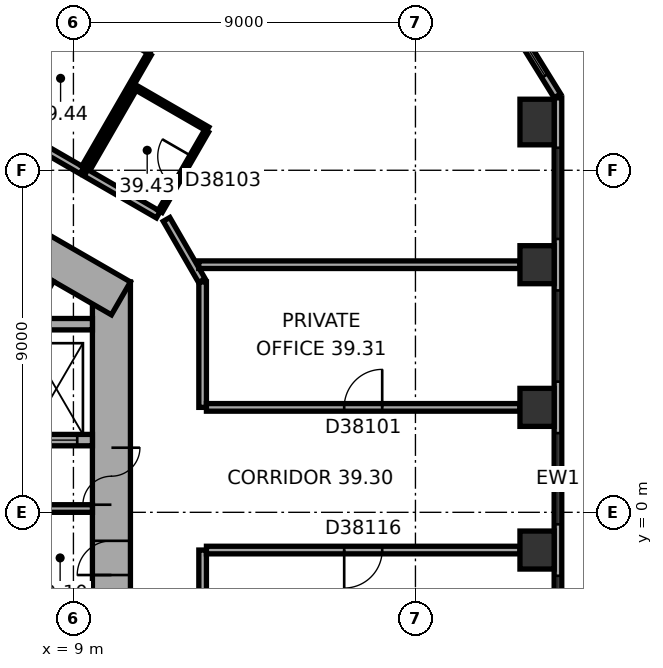
"""IFC4 building model, lengths in metres.
Left out: names, types, materials, properties, quantities, classifications, styles, units other than length and angle.
Written with IfcOpenShell. Run it as: python <this file> out.ifc"""

import sys

from ifc_helpers import new_model, si_unit, direction, frame, frame_2d, origin, origin_2d, place, context, subcontext, project, spatial, rectangle, extrude, element, fill, save


model = new_model("IFC4")
c1 = context("Model", 3, precision=1e-05, world=origin(), true_north=direction((0.0, 1.0)))
c2 = subcontext(c1, "Body", "Model", "MODEL_VIEW")
j1 = project(units=[si_unit("LENGTHUNIT", "METRE"), si_unit("PLANEANGLEUNIT", "RADIAN")], contexts=[c1])
p1 = place(None, origin())
s1 = spatial("IfcSite", under=j1, at=p1, CompositionType="ELEMENT")
p2 = place(p1, origin())
s2 = spatial("IfcBuilding", under=s1, at=p2, CompositionType="ELEMENT")
p3 = place(p2, frame((0.0, 0.0, 161.4)))
s3 = spatial("IfcBuildingStorey", under=s2, at=p3, CompositionType="ELEMENT", Elevation=161.4)
for number, where, z_axis, x_axis in (
    (1, (21.2, -0.993, 0.0), (0.0, 0.0, 1.0), (0.0, 1.0, 0.0)),
    (2, (21.2, 2.761, 0.0), (0.0, 0.0, 1.0), (0.0, 1.0, 0.0)),
    (3, (21.2, 6.515, 0.0), (0.0, 0.0, 1.0), (0.0, 1.0, 0.0)),
):
    element("IfcColumn", number, at=place(p3, frame(where, z_axis=z_axis, x_axis=x_axis)), inside=s3, PredefinedType="COLUMN", context=c2, shape_type="SweptSolid", body=[
        extrude(rectangle(XDim=1.0, YDim=0.9, at=origin_2d()), origin(), (0.0, 0.0, 1.0), 3.7),
    ])
p4 = place(p3, frame((21.2, 10.27, 0.0), z_axis=(0.0, 0.0, 1.0), x_axis=(0.0, 1.0, 0.0)))
e4 = element("IfcColumn", 4, at=p4, inside=s3, PredefinedType="COLUMN", context=c2, shape_type="SweptSolid", body=[
    extrude(rectangle(XDim=1.2, YDim=0.9, at=origin_2d()), origin(), (0.0, 0.0, 1.0), 3.7),
])
p5 = place(p3, frame((10.0, -6.062, 0.0), z_axis=(0.0, 0.0, 1.0), x_axis=(0.0, 1.0, 0.0)))
e5 = element("IfcWall", 5, at=p5, inside=s3, PredefinedType="SHEAR", context=c2, shape_type="SweptSolid", body=[
    extrude(rectangle(XDim=12.125, YDim=1.0, at=frame_2d((6.062, 0.0))), origin(), (0.0, 0.0, 1.0), 3.7),
])
p6 = place(p5, frame((6.262, 0.0, 0.0)))
e6 = element("IfcOpeningElement", 6, at=p6, cuts=e5, PredefinedType="OPENING", context=c2, shape_type="SweptSolid", body=[
    extrude(rectangle(XDim=1.5, YDim=2.1, at=frame_2d((0.75, 1.05))), frame((0.0, 0.51, 0.0), z_axis=(0.0, -1.0, 0.0), x_axis=(1.0, 0.0, 0.0)), (0.0, 0.0, 1.0), 1.02),
])
p7 = place(p5, frame((1.812, 0.0, 0.0)))
e7 = element("IfcOpeningElement", 7, at=p7, cuts=e5, PredefinedType="OPENING", context=c2, shape_type="SweptSolid", body=[
    extrude(rectangle(XDim=0.9, YDim=2.1, at=frame_2d((0.45, 1.05))), frame((0.0, 0.51, 0.0), z_axis=(0.0, -1.0, 0.0), x_axis=(1.0, 0.0, 0.0)), (0.0, 0.0, 1.0), 1.02),
])
p8 = place(p5, frame((4.412, 0.0, 0.0)))
e8 = element("IfcOpeningElement", 8, at=p8, cuts=e5, PredefinedType="OPENING", context=c2, shape_type="SweptSolid", body=[
    extrude(rectangle(XDim=0.9, YDim=2.1, at=frame_2d((0.45, 1.05))), frame((0.0, 0.51, 0.0), z_axis=(0.0, -1.0, 0.0), x_axis=(1.0, 0.0, 0.0)), (0.0, 0.0, 1.0), 1.02),
])
p9 = place(p3, frame((10.25, 5.629, 0.0), z_axis=(0.0, 0.0, 1.0), x_axis=(-0.866022616891, 0.50000482701, 0.0)))
e9 = element("IfcWall", 9, at=p9, inside=s3, PredefinedType="SHEAR", context=c2, shape_type="SweptSolid", body=[
    extrude(rectangle(XDim=12.125, YDim=1.0, at=frame_2d((6.062, 0.0))), origin(), (0.0, 0.0, 1.0), 3.7),
])
p10 = place(p9, frame((2.712, 0.0, 0.0)))
e10 = element("IfcOpeningElement", 10, at=p10, cuts=e9, PredefinedType="OPENING", context=c2, shape_type="SweptSolid", body=[
    extrude(rectangle(XDim=0.9, YDim=2.1, at=frame_2d((0.45, 1.05))), frame((0.0, 0.51, 0.0), z_axis=(0.0, -1.0, 0.0), x_axis=(1.0, 0.0, 0.0)), (0.0, 0.0, 1.0), 1.02),
])
p11 = place(p9, frame((6.612, 0.0, 0.0)))
e11 = element("IfcOpeningElement", 11, at=p11, cuts=e9, PredefinedType="OPENING", context=c2, shape_type="SweptSolid", body=[
    extrude(rectangle(XDim=0.9, YDim=2.1, at=frame_2d((0.45, 1.05))), frame((0.0, 0.51, 0.0), z_axis=(0.0, -1.0, 0.0), x_axis=(1.0, 0.0, 0.0)), (0.0, 0.0, 1.0), 1.02),
])
p12 = place(p3, frame((21.75, -9.138, 0.0), z_axis=(0.0, 0.0, 1.0), x_axis=(0.0, 1.0, 0.0)))
e12 = element("IfcWall", 12, at=p12, inside=s3, PredefinedType="STANDARD", context=c2, shape_type="SweptSolid", body=[
    extrude(rectangle(XDim=20.044, YDim=0.2, at=frame_2d((10.022, 0.0))), origin(), (0.0, 0.0, 1.0), 3.7),
])
p13 = place(p12, frame((1.314, 0.0, 0.9)))
e13 = element("IfcOpeningElement", 13, at=p13, cuts=e12, PredefinedType="OPENING", context=c2, shape_type="SweptSolid", body=[
    extrude(rectangle(XDim=2.4, YDim=2.0, at=frame_2d((1.2, 1.0))), frame((0.0, 0.11, 0.0), z_axis=(0.0, -1.0, 0.0), x_axis=(1.0, 0.0, 0.0)), (0.0, 0.0, 1.0), 0.22),
])
p14 = place(p12, frame((5.069, 0.0, 0.9)))
e14 = element("IfcOpeningElement", 14, at=p14, cuts=e12, PredefinedType="OPENING", context=c2, shape_type="SweptSolid", body=[
    extrude(rectangle(XDim=2.4, YDim=2.0, at=frame_2d((1.2, 1.0))), frame((0.0, 0.11, 0.0), z_axis=(0.0, -1.0, 0.0), x_axis=(1.0, 0.0, 0.0)), (0.0, 0.0, 1.0), 0.22),
])
p15 = place(p12, frame((8.823, 0.0, 0.9)))
e15 = element("IfcOpeningElement", 15, at=p15, cuts=e12, PredefinedType="OPENING", context=c2, shape_type="SweptSolid", body=[
    extrude(rectangle(XDim=2.4, YDim=2.0, at=frame_2d((1.2, 1.0))), frame((0.0, 0.11, 0.0), z_axis=(0.0, -1.0, 0.0), x_axis=(1.0, 0.0, 0.0)), (0.0, 0.0, 1.0), 0.22),
])
p16 = place(p12, frame((12.577, 0.0, 0.9)))
e16 = element("IfcOpeningElement", 16, at=p16, cuts=e12, PredefinedType="OPENING", context=c2, shape_type="SweptSolid", body=[
    extrude(rectangle(XDim=2.4, YDim=2.0, at=frame_2d((1.2, 1.0))), frame((0.0, 0.11, 0.0), z_axis=(0.0, -1.0, 0.0), x_axis=(1.0, 0.0, 0.0)), (0.0, 0.0, 1.0), 0.22),
])
p17 = place(p12, frame((16.331, 0.0, 0.9)))
e17 = element("IfcOpeningElement", 17, at=p17, cuts=e12, PredefinedType="OPENING", context=c2, shape_type="SweptSolid", body=[
    extrude(rectangle(XDim=2.4, YDim=2.0, at=frame_2d((1.2, 1.0))), frame((0.0, 0.11, 0.0), z_axis=(0.0, -1.0, 0.0), x_axis=(1.0, 0.0, 0.0)), (0.0, 0.0, 1.0), 0.22),
])
p18 = place(p3, frame((21.735, 10.958, 0.0), z_axis=(0.0, 0.0, 1.0), x_axis=(-0.526213807775, 0.850352296702, 0.0)))
e18 = element("IfcWall", 18, at=p18, inside=s3, PredefinedType="STANDARD", context=c2, shape_type="SweptSolid", body=[
    extrude(rectangle(XDim=4.238, YDim=0.2, at=frame_2d((2.119, 0.0))), origin(), (0.0, 0.0, 1.0), 3.7),
])
p19 = place(p18, frame((0.619, 0.0, 0.9)))
e19 = element("IfcOpeningElement", 19, at=p19, cuts=e18, PredefinedType="OPENING", context=c2, shape_type="SweptSolid", body=[
    extrude(rectangle(XDim=3.0, YDim=2.0, at=frame_2d((1.5, 1.0))), frame((0.0, 0.11, 0.0), z_axis=(0.0, -1.0, 0.0), x_axis=(1.0, 0.0, 0.0)), (0.0, 0.0, 1.0), 0.22),
])
for number, where, z_axis, x_axis in (
    (20, (7.3, 0.1, 0.0), (0.0, 0.0, 1.0), (1.0, 0.0, 0.0)),
    (21, (7.287, 4.222, 0.0), (0.0, 0.0, 1.0), (0.5, 0.866, 0.0)),
):
    element("IfcWall", number, at=place(p3, frame(where, z_axis=z_axis, x_axis=x_axis)), inside=s3, PredefinedType="PARTITIONING", context=c2, shape_type="SweptSolid", body=[
        extrude(rectangle(XDim=2.2, YDim=0.2, at=frame_2d((1.1, 0.0))), origin(), (0.0, 0.0, 1.0), 3.42),
    ])
p20 = place(p3, frame((7.3, 1.9, 0.0), z_axis=(0.0, 0.0, 1.0), x_axis=(1.0, 0.0, 0.0)))
e22 = element("IfcWall", 22, at=p20, inside=s3, PredefinedType="SHEAR", context=c2, shape_type="SweptSolid", body=[
    extrude(rectangle(XDim=2.2, YDim=0.3, at=frame_2d((1.1, 0.0))), origin(), (0.0, 0.0, 1.0), 3.42),
])
p21 = place(p20, frame((0.7, 0.0, 0.0)))
e23 = element("IfcOpeningElement", 23, at=p21, cuts=e22, PredefinedType="OPENING", context=c2, shape_type="SweptSolid", body=[
    extrude(rectangle(XDim=1.1, YDim=2.1, at=frame_2d((0.55, 1.05))), frame((0.0, 0.16, 0.0), z_axis=(0.0, -1.0, 0.0), x_axis=(1.0, 0.0, 0.0)), (0.0, 0.0, 1.0), 0.32),
])
p22 = place(p3, frame((7.3, 4.95, 0.0), z_axis=(0.0, 0.0, 1.0), x_axis=(1.0, 0.0, 0.0)))
e24 = element("IfcWall", 24, at=p22, inside=s3, PredefinedType="SHEAR", context=c2, shape_type="SweptSolid", body=[
    extrude(rectangle(XDim=2.2, YDim=0.3, at=frame_2d((1.1, 0.0))), origin(), (0.0, 0.0, 1.0), 3.42),
])
p23 = place(p3, frame((8.132, 13.78, 0.0), z_axis=(0.0, 0.0, 1.0), x_axis=(0.866039519639, -0.499975549825, 0.0)))
e25 = element("IfcWall", 25, at=p23, inside=s3, PredefinedType="PARTITIONING", context=c2, shape_type="SweptSolid", body=[
    extrude(rectangle(XDim=3.34, YDim=0.12, at=frame_2d((1.67, 0.0))), origin(), (0.0, 0.0, 1.0), 3.42),
])
p24 = place(p3, frame((8.37, 19.013, 0.0), z_axis=(0.0, 0.0, 1.0), x_axis=(-0.446183598632, -0.894941448538, 0.0)))
e26 = element("IfcWall", 26, at=p24, inside=s3, PredefinedType="PARTITIONING", context=c2, shape_type="SweptSolid", body=[
    extrude(rectangle(XDim=8.156, YDim=0.2, at=frame_2d((4.078, 0.0))), origin(), (0.0, 0.0, 1.0), 3.42),
])
p25 = place(p3, frame((9.224, 8.993, 0.0), z_axis=(0.0, 0.0, 1.0), x_axis=(-0.866031754707, 0.499988999718, 0.0)))
e27 = element("IfcWall", 27, at=p25, inside=s3, PredefinedType="PARTITIONING", context=c2, shape_type="SweptSolid", body=[
    extrude(rectangle(XDim=9.514, YDim=0.2, at=frame_2d((4.757, 0.0))), origin(), (0.0, 0.0, 1.0), 3.42),
])
p26 = place(p25, frame((3.848, 0.0, 0.0)))
e28 = element("IfcOpeningElement", 28, at=p26, cuts=e27, PredefinedType="OPENING", context=c2, shape_type="SweptSolid", body=[
    extrude(rectangle(XDim=1.0, YDim=2.1, at=frame_2d((0.5, 1.05))), frame((0.0, 0.11, 0.0), z_axis=(0.0, -1.0, 0.0), x_axis=(1.0, 0.0, 0.0)), (0.0, 0.0, 1.0), 0.22),
])
p27 = place(p3, frame((9.378, 9.019, 0.0), z_axis=(0.0, 0.0, 1.0), x_axis=(0.500004234368, 0.866022959057, 0.0)))
e29 = element("IfcWall", 29, at=p27, inside=s3, PredefinedType="PARTITIONING", context=c2, shape_type="SweptSolid", body=[
    extrude(rectangle(XDim=2.5, YDim=0.12, at=frame_2d((1.25, 0.0))), origin(), (0.0, 0.0, 1.0), 3.42),
])
p28 = place(p3, frame((10.68, 11.154, 0.0), z_axis=(0.0, 0.0, 1.0), x_axis=(0.86600889856, -0.500028586798, 0.0)))
e30 = element("IfcWall", 30, at=p28, inside=s3, PredefinedType="PARTITIONING", context=c2, shape_type="SweptSolid", body=[
    extrude(rectangle(XDim=2.14, YDim=0.12, at=frame_2d((1.07, 0.0))), origin(), (0.0, 0.0, 1.0), 3.42),
])
p29 = place(p3, frame((10.994, 12.058, 0.0), z_axis=(0.0, 0.0, 1.0), x_axis=(-0.500009156386, -0.866020117278, 0.0)))
e31 = element("IfcWall", 31, at=p29, inside=s3, PredefinedType="PARTITIONING", context=c2, shape_type="SweptSolid", body=[
    extrude(rectangle(XDim=3.44, YDim=0.12, at=frame_2d((1.72, 0.0))), origin(), (0.0, 0.0, 1.0), 3.42),
])
p30 = place(p3, frame((11.233, 7.833, 0.0), z_axis=(0.0, 0.0, 1.0), x_axis=(-0.866008176907, 0.50002983664, 0.0)))
e32 = element("IfcWall", 32, at=p30, inside=s3, PredefinedType="PARTITIONING", context=c2, shape_type="SweptSolid", body=[
    extrude(rectangle(XDim=2.2, YDim=0.2, at=frame_2d((1.1, 0.0))), origin(), (0.0, 0.0, 1.0), 3.42),
])
p31 = place(p3, frame((12.38, 6.097, 0.0), z_axis=(0.0, 0.0, 1.0), x_axis=(-0.499964847546, 0.866045698112, 0.0)))
e33 = element("IfcWall", 33, at=p31, inside=s3, PredefinedType="PARTITIONING", context=c2, shape_type="SweptSolid", body=[
    extrude(rectangle(XDim=1.86, YDim=0.2, at=frame_2d((0.93, 0.0))), origin(), (0.0, 0.0, 1.0), 3.42),
])
p32 = place(p3, frame((12.4, -6.022, 0.0), z_axis=(0.0, 0.0, 1.0), x_axis=(0.0, 1.0, 0.0)))
e34 = element("IfcWall", 34, at=p32, inside=s3, PredefinedType="PARTITIONING", context=c2, shape_type="SweptSolid", body=[
    extrude(rectangle(XDim=5.029, YDim=0.2, at=frame_2d((2.515, 0.0))), origin(), (0.0, 0.0, 1.0), 3.42),
])
p33 = place(p3, frame((12.4, 2.761, 0.0), z_axis=(0.0, 0.0, 1.0), x_axis=(0.0, 1.0, 0.0)))
e35 = element("IfcWall", 35, at=p33, inside=s3, PredefinedType="PARTITIONING", context=c2, shape_type="SweptSolid", body=[
    extrude(rectangle(XDim=3.301, YDim=0.2, at=frame_2d((1.65, 0.0))), origin(), (0.0, 0.0, 1.0), 3.42),
])
p34 = place(p3, frame((12.5, -0.993, 0.0), z_axis=(0.0, 0.0, 1.0), x_axis=(1.0, 0.0, 0.0)))
e36 = element("IfcWall", 36, at=p34, inside=s3, PredefinedType="PARTITIONING", context=c2, shape_type="SweptSolid", body=[
    extrude(rectangle(XDim=8.25, YDim=0.2, at=frame_2d((4.125, 0.0))), origin(), (0.0, 0.0, 1.0), 2.87),
])
p35 = place(p34, frame((3.625, 0.0, 0.0)))
e37 = element("IfcOpeningElement", 37, at=p35, cuts=e36, PredefinedType="OPENING", context=c2, shape_type="SweptSolid", body=[
    extrude(rectangle(XDim=1.0, YDim=2.1, at=frame_2d((0.5, 1.05))), frame((0.0, 0.11, 0.0), z_axis=(0.0, -1.0, 0.0), x_axis=(1.0, 0.0, 0.0)), (0.0, 0.0, 1.0), 0.22),
])
p36 = place(p3, frame((12.503, 10.032, 0.0), z_axis=(0.0, 0.0, 1.0), x_axis=(-0.500002508028, -0.866023955769, 0.0)))
e38 = element("IfcWall", 38, at=p36, inside=s3, PredefinedType="PARTITIONING", context=c2, shape_type="SweptSolid", body=[
    extrude(rectangle(XDim=2.44, YDim=0.12, at=frame_2d((1.22, 0.0))), origin(), (0.0, 0.0, 1.0), 3.42),
])
p37 = place(p36, frame((0.77, 0.0, 0.0)))
e39 = element("IfcOpeningElement", 39, at=p37, cuts=e38, PredefinedType="OPENING", context=c2, shape_type="SweptSolid", body=[
    extrude(rectangle(XDim=0.9, YDim=2.1, at=frame_2d((0.45, 1.05))), frame((0.0, 0.07, 0.0), z_axis=(0.0, -1.0, 0.0), x_axis=(1.0, 0.0, 0.0)), (0.0, 0.0, 1.0), 0.14),
])
p38 = place(p3, frame((20.75, 2.761, 0.0), z_axis=(0.0, 0.0, 1.0), x_axis=(-1.0, 0.0, 0.0)))
e40 = element("IfcWall", 40, at=p38, inside=s3, PredefinedType="PARTITIONING", context=c2, shape_type="SweptSolid", body=[
    extrude(rectangle(XDim=8.25, YDim=0.2, at=frame_2d((4.125, 0.0))), origin(), (0.0, 0.0, 1.0), 3.42),
])
p39 = place(p38, frame((3.625, 0.0, 0.0)))
e41 = element("IfcOpeningElement", 41, at=p39, cuts=e40, PredefinedType="OPENING", context=c2, shape_type="SweptSolid", body=[
    extrude(rectangle(XDim=1.0, YDim=2.1, at=frame_2d((0.5, 1.05))), frame((0.0, 0.11, 0.0), z_axis=(0.0, -1.0, 0.0), x_axis=(1.0, 0.0, 0.0)), (0.0, 0.0, 1.0), 0.22),
])
p40 = place(p3, frame((20.75, 6.515, 0.0), z_axis=(0.0, 0.0, 1.0), x_axis=(-1.0, 0.0, 0.0)))
e42 = element("IfcWall", 42, at=p40, inside=s3, PredefinedType="PARTITIONING", context=c2, shape_type="SweptSolid", body=[
    extrude(rectangle(XDim=8.452, YDim=0.2, at=frame_2d((4.226, 0.0))), origin(), (0.0, 0.0, 1.0), 3.42),
])
p41 = place(p14, origin())
e43 = element("IfcWindow", 43, at=p41, inside=s3, PartitioningType="SINGLE_PANEL", PredefinedType="WINDOW", context=c2, shape_type="SweptSolid", body=[
    extrude(rectangle(XDim=2.4, YDim=2.0, at=frame_2d((1.2, 1.0))), frame((0.0, 0.03, 0.0), z_axis=(0.0, -1.0, 0.0), x_axis=(1.0, 0.0, 0.0)), (0.0, 0.0, 1.0), 0.06),
])
fill(e14, e43)
p42 = place(p15, origin())
e44 = element("IfcWindow", 44, at=p42, inside=s3, PartitioningType="SINGLE_PANEL", PredefinedType="WINDOW", context=c2, shape_type="SweptSolid", body=[
    extrude(rectangle(XDim=2.4, YDim=2.0, at=frame_2d((1.2, 1.0))), frame((0.0, 0.03, 0.0), z_axis=(0.0, -1.0, 0.0), x_axis=(1.0, 0.0, 0.0)), (0.0, 0.0, 1.0), 0.06),
])
fill(e15, e44)
p43 = place(p16, origin())
e45 = element("IfcWindow", 45, at=p43, inside=s3, PartitioningType="SINGLE_PANEL", PredefinedType="WINDOW", context=c2, shape_type="SweptSolid", body=[
    extrude(rectangle(XDim=2.4, YDim=2.0, at=frame_2d((1.2, 1.0))), frame((0.0, 0.03, 0.0), z_axis=(0.0, -1.0, 0.0), x_axis=(1.0, 0.0, 0.0)), (0.0, 0.0, 1.0), 0.06),
])
fill(e16, e45)
p44 = place(p17, origin())
e46 = element("IfcWindow", 46, at=p44, inside=s3, PartitioningType="SINGLE_PANEL", PredefinedType="WINDOW", context=c2, shape_type="SweptSolid", body=[
    extrude(rectangle(XDim=2.4, YDim=2.0, at=frame_2d((1.2, 1.0))), frame((0.0, 0.03, 0.0), z_axis=(0.0, -1.0, 0.0), x_axis=(1.0, 0.0, 0.0)), (0.0, 0.0, 1.0), 0.06),
])
fill(e17, e46)
p45 = place(p19, origin())
e47 = element("IfcWindow", 47, at=p45, inside=s3, PartitioningType="SINGLE_PANEL", PredefinedType="WINDOW", context=c2, shape_type="SweptSolid", body=[
    extrude(rectangle(XDim=3.0, YDim=2.0, at=frame_2d((1.5, 1.0))), frame((0.0, 0.03, 0.0), z_axis=(0.0, -1.0, 0.0), x_axis=(1.0, 0.0, 0.0)), (0.0, 0.0, 1.0), 0.06),
])
fill(e19, e47)
p46 = place(p6, origin())
e48 = element("IfcDoor", 48, at=p46, inside=s3, OperationType="DOUBLE_DOOR_SINGLE_SWING", PredefinedType="DOOR", context=c2, shape_type="SweptSolid", body=[
    extrude(rectangle(XDim=1.5, YDim=2.1, at=frame_2d((0.75, 1.05))), frame((0.0, 0.025, 0.0), z_axis=(0.0, -1.0, 0.0), x_axis=(1.0, 0.0, 0.0)), (0.0, 0.0, 1.0), 0.05),
])
fill(e6, e48)
p47 = place(p8, origin())
e49 = element("IfcDoor", 49, at=p47, inside=s3, OperationType="SINGLE_SWING_LEFT", PredefinedType="DOOR", context=c2, shape_type="SweptSolid", body=[
    extrude(rectangle(XDim=0.9, YDim=2.1, at=frame_2d((0.45, 1.05))), frame((0.0, 0.025, 0.0), z_axis=(0.0, -1.0, 0.0), x_axis=(1.0, 0.0, 0.0)), (0.0, 0.0, 1.0), 0.05),
])
fill(e8, e49)
p48 = place(p21, origin())
e50 = element("IfcDoor", 50, at=p48, inside=s3, OperationType="DOUBLE_DOOR_SLIDING", PredefinedType="DOOR", context=c2, shape_type="SweptSolid", body=[
    extrude(rectangle(XDim=1.1, YDim=2.1, at=frame_2d((0.55, 1.05))), frame((0.0, 0.025, 0.0), z_axis=(0.0, -1.0, 0.0), x_axis=(1.0, 0.0, 0.0)), (0.0, 0.0, 1.0), 0.05),
])
fill(e23, e50)
p49 = place(p39, origin())
e51 = element("IfcDoor", 51, at=p49, inside=s3, OperationType="SINGLE_SWING_LEFT", PredefinedType="DOOR", context=c2, shape_type="SweptSolid", body=[
    extrude(rectangle(XDim=1.0, YDim=2.1, at=frame_2d((0.5, 1.05))), frame((0.0, 0.025, 0.0), z_axis=(0.0, -1.0, 0.0), x_axis=(1.0, 0.0, 0.0)), (0.0, 0.0, 1.0), 0.05),
])
fill(e41, e51)
p50 = place(p37, origin())
e52 = element("IfcDoor", 52, at=p50, inside=s3, OperationType="SINGLE_SWING_LEFT", PredefinedType="DOOR", context=c2, shape_type="SweptSolid", body=[
    extrude(rectangle(XDim=0.9, YDim=2.1, at=frame_2d((0.45, 1.05))), frame((0.0, 0.025, 0.0), z_axis=(0.0, -1.0, 0.0), x_axis=(1.0, 0.0, 0.0)), (0.0, 0.0, 1.0), 0.05),
])
fill(e39, e52)
p51 = place(p35, origin())
e53 = element("IfcDoor", 53, at=p51, inside=s3, OperationType="SINGLE_SWING_LEFT", PredefinedType="DOOR", context=c2, shape_type="SweptSolid", body=[
    extrude(rectangle(XDim=1.0, YDim=2.1, at=frame_2d((0.5, 1.05))), frame((0.0, 0.025, 0.0), z_axis=(0.0, -1.0, 0.0), x_axis=(1.0, 0.0, 0.0)), (0.0, 0.0, 1.0), 0.05),
])
fill(e37, e53)
save(model, sys.argv[1])
